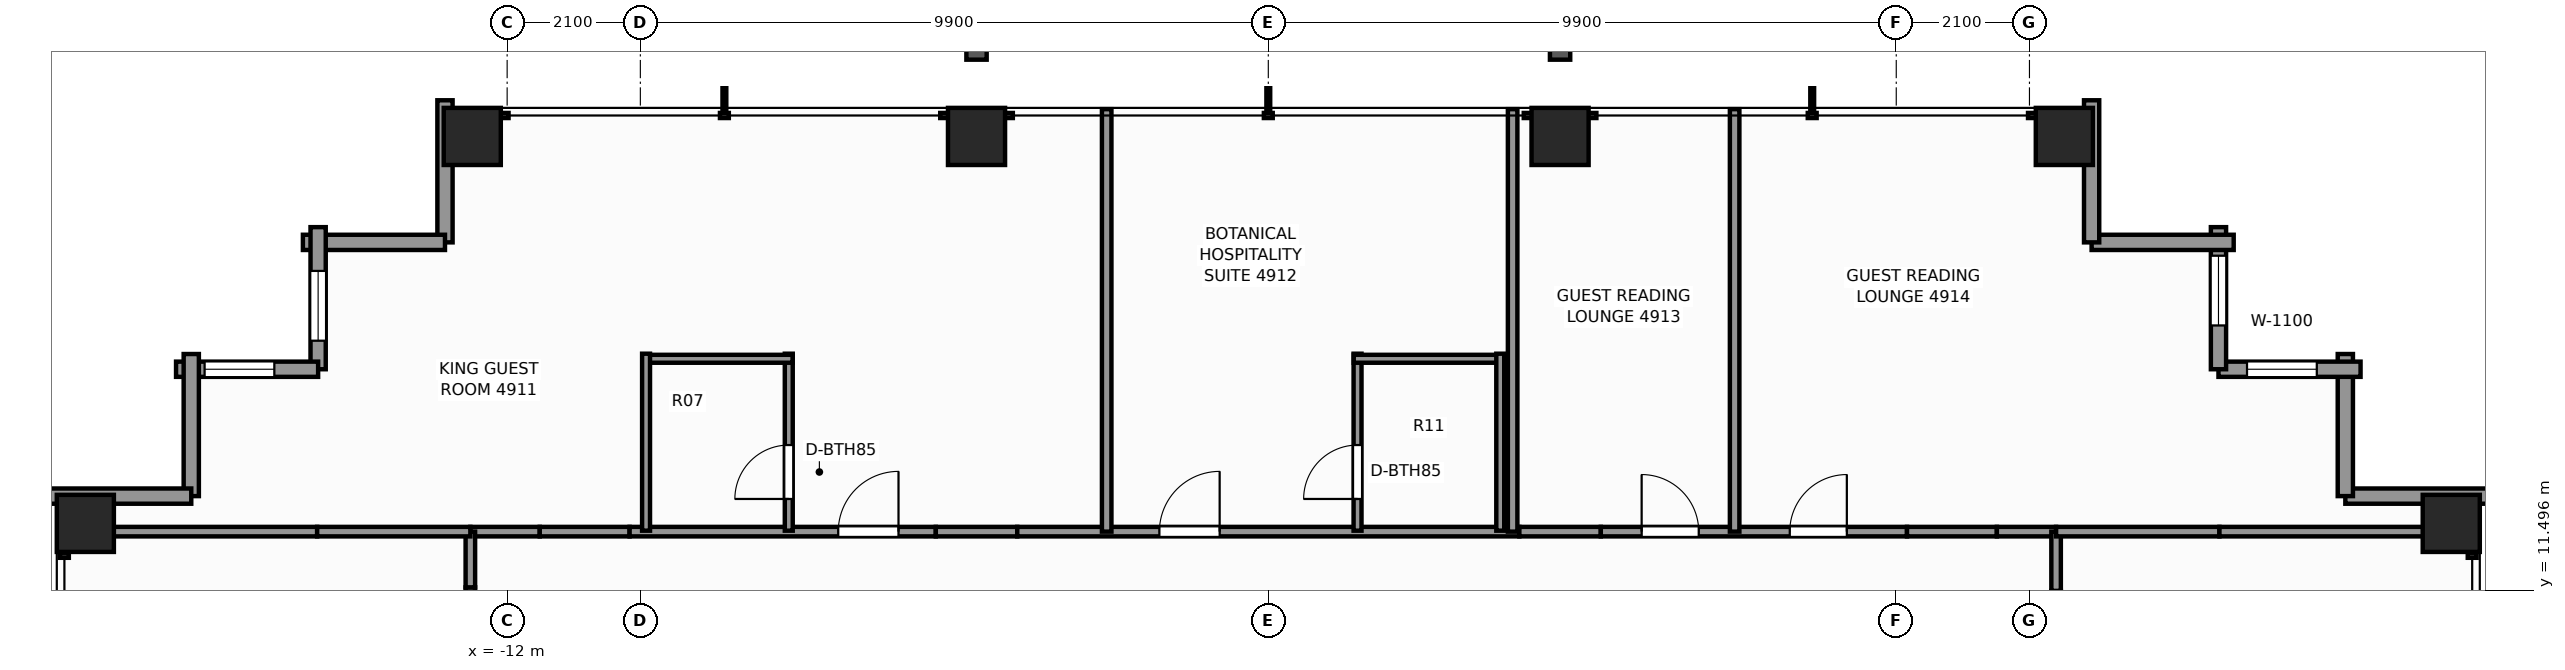
"""IFC4 building model, lengths in metres.
Left out: names, types, materials, properties, quantities, classifications, styles, units other than length and angle.
Written with IfcOpenShell. Run it as: python <this file> out.ifc"""

import sys

from ifc_helpers import new_model, si_unit, direction, frame, frame_2d, origin, origin_2d, place, context, subcontext, project, spatial, rectangle, extrude, element, fill, save


model = new_model("IFC4")
c1 = context("Model", 3, precision=1e-05, world=origin(), true_north=direction((0.0, 1.0)))
c2 = subcontext(c1, "Body", "Model", "MODEL_VIEW")
j1 = project(units=[si_unit("LENGTHUNIT", "METRE"), si_unit("PLANEANGLEUNIT", "RADIAN")], contexts=[c1])
p1 = place(None, origin())
s1 = spatial("IfcSite", under=j1, at=p1, CompositionType="ELEMENT")
p2 = place(p1, origin())
s2 = spatial("IfcBuilding", under=s1, at=p2, CompositionType="ELEMENT")
p3 = place(p2, frame((0.0, 0.0, 170.1)))
s3 = spatial("IfcBuildingStorey", under=s2, at=p3, CompositionType="ELEMENT", Elevation=170.1)
for number, where, z_axis, x_axis in (
    (1, (-12.55, 18.65, 0.0), (0.0, 0.0, 1.0), (1.0, 0.0, 0.0)),
    (2, (-4.6, 18.65, 0.0), (0.0, 0.0, 1.0), (1.0, 0.0, 0.0)),
    (3, (4.6, 18.65, 0.0), (0.0, 0.0, 1.0), (1.0, 0.0, 0.0)),
    (4, (12.55, 18.65, 0.0), (0.0, 0.0, 1.0), (1.0, 0.0, 0.0)),
    (5, (-18.65, 12.55, 0.0), (0.0, 0.0, 1.0), (1.0, 0.0, 0.0)),
    (6, (18.65, 12.55, 0.0), (0.0, 0.0, 1.0), (1.0, 0.0, 0.0)),
):
    element("IfcColumn", number, at=place(p3, frame(where, z_axis=z_axis, x_axis=x_axis)), inside=s3, PredefinedType="COLUMN", context=c2, shape_type="SweptSolid", body=[
        extrude(rectangle(XDim=0.9, YDim=0.9, at=origin_2d()), origin(), (0.0, 0.0, 1.0), 3.3),
    ])
for number, where, z_axis, x_axis in (
    (7, (16.98, 12.98, 0.0), (0.0, 0.0, 1.0), (1.0, 0.0, 0.0)),
    (8, (16.98, 15.22, 0.0), (0.0, 0.0, 1.0), (0.0, -1.0, 0.0)),
):
    element("IfcWall", number, at=place(p3, frame(where, z_axis=z_axis, x_axis=x_axis)), inside=s3, PredefinedType="STANDARD", context=c2, shape_type="SweptSolid", body=[
        extrude(rectangle(XDim=2.24, YDim=0.24, at=frame_2d((1.12, 0.0))), origin(), (0.0, 0.0, 1.0), 1.275),
    ])
p4 = place(p3, frame((14.98, 14.98, 0.0), z_axis=(0.0, 0.0, 1.0), x_axis=(1.0, 0.0, 0.0)))
e9 = element("IfcWall", 9, at=p4, inside=s3, PredefinedType="STANDARD", context=c2, shape_type="SweptSolid", body=[
    extrude(rectangle(XDim=2.24, YDim=0.24, at=frame_2d((1.12, 0.0))), origin(), (0.0, 0.0, 1.0), 2.463),
])
p5 = place(p4, frame((0.45, 0.0, 0.65)))
e10 = element("IfcOpeningElement", 10, at=p5, cuts=e9, PredefinedType="OPENING", context=c2, shape_type="SweptSolid", body=[
    extrude(rectangle(XDim=1.1, YDim=1.45, at=frame_2d((0.55, 0.725))), frame((0.0, 0.13, 0.0), z_axis=(0.0, -1.0, 0.0), x_axis=(1.0, 0.0, 0.0)), (0.0, 0.0, 1.0), 0.26),
])
p6 = place(p3, frame((14.98, 17.22, 0.0), z_axis=(0.0, 0.0, 1.0), x_axis=(0.0, -1.0, 0.0)))
e11 = element("IfcWall", 11, at=p6, inside=s3, PredefinedType="STANDARD", context=c2, shape_type="SweptSolid", body=[
    extrude(rectangle(XDim=2.24, YDim=0.24, at=frame_2d((1.12, 0.0))), origin(), (0.0, 0.0, 1.0), 2.463),
])
p7 = place(p6, frame((0.45, 0.0, 0.65)))
e12 = element("IfcOpeningElement", 12, at=p7, cuts=e11, PredefinedType="OPENING", context=c2, shape_type="SweptSolid", body=[
    extrude(rectangle(XDim=1.1, YDim=1.45, at=frame_2d((0.55, 0.725))), frame((0.0, 0.13, 0.0), z_axis=(0.0, -1.0, 0.0), x_axis=(1.0, 0.0, 0.0)), (0.0, 0.0, 1.0), 0.26),
])
for number, where, z_axis, x_axis in (
    (13, (12.98, 16.98, 0.0), (0.0, 0.0, 1.0), (1.0, 0.0, 0.0)),
    (14, (12.98, 19.22, 0.0), (0.0, 0.0, 1.0), (0.0, -1.0, 0.0)),
    (15, (-12.98, 16.98, 0.0), (0.0, 0.0, 1.0), (0.0, 1.0, 0.0)),
    (16, (-15.22, 16.98, 0.0), (0.0, 0.0, 1.0), (1.0, 0.0, 0.0)),
):
    element("IfcWall", number, at=place(p3, frame(where, z_axis=z_axis, x_axis=x_axis)), inside=s3, PredefinedType="STANDARD", context=c2, shape_type="SweptSolid", body=[
        extrude(rectangle(XDim=2.24, YDim=0.24, at=frame_2d((1.12, 0.0))), origin(), (0.0, 0.0, 1.0), 1.275),
    ])
p8 = place(p3, frame((-14.98, 14.98, 0.0), z_axis=(0.0, 0.0, 1.0), x_axis=(0.0, 1.0, 0.0)))
e17 = element("IfcWall", 17, at=p8, inside=s3, PredefinedType="STANDARD", context=c2, shape_type="SweptSolid", body=[
    extrude(rectangle(XDim=2.24, YDim=0.24, at=frame_2d((1.12, 0.0))), origin(), (0.0, 0.0, 1.0), 2.463),
])
p9 = place(p8, frame((0.45, 0.0, 0.65)))
e18 = element("IfcOpeningElement", 18, at=p9, cuts=e17, PredefinedType="OPENING", context=c2, shape_type="SweptSolid", body=[
    extrude(rectangle(XDim=1.1, YDim=1.45, at=frame_2d((0.55, 0.725))), frame((0.0, 0.13, 0.0), z_axis=(0.0, -1.0, 0.0), x_axis=(1.0, 0.0, 0.0)), (0.0, 0.0, 1.0), 0.26),
])
p10 = place(p3, frame((-17.22, 14.98, 0.0), z_axis=(0.0, 0.0, 1.0), x_axis=(1.0, 0.0, 0.0)))
e19 = element("IfcWall", 19, at=p10, inside=s3, PredefinedType="STANDARD", context=c2, shape_type="SweptSolid", body=[
    extrude(rectangle(XDim=2.24, YDim=0.24, at=frame_2d((1.12, 0.0))), origin(), (0.0, 0.0, 1.0), 2.463),
])
p11 = place(p10, frame((0.45, 0.0, 0.65)))
e20 = element("IfcOpeningElement", 20, at=p11, cuts=e19, PredefinedType="OPENING", context=c2, shape_type="SweptSolid", body=[
    extrude(rectangle(XDim=1.1, YDim=1.45, at=frame_2d((0.55, 0.725))), frame((0.0, 0.13, 0.0), z_axis=(0.0, -1.0, 0.0), x_axis=(1.0, 0.0, 0.0)), (0.0, 0.0, 1.0), 0.26),
])
for number, where, z_axis, x_axis in (
    (21, (-16.98, 12.98, 0.0), (0.0, 0.0, 1.0), (0.0, 1.0, 0.0)),
    (22, (-19.22, 12.98, 0.0), (0.0, 0.0, 1.0), (1.0, 0.0, 0.0)),
):
    element("IfcWall", number, at=place(p3, frame(where, z_axis=z_axis, x_axis=x_axis)), inside=s3, PredefinedType="STANDARD", context=c2, shape_type="SweptSolid", body=[
        extrude(rectangle(XDim=2.24, YDim=0.24, at=frame_2d((1.12, 0.0))), origin(), (0.0, 0.0, 1.0), 1.275),
    ])
p12 = place(p3, frame((-12.58, 12.42, 0.0), z_axis=(0.0, 0.0, 1.0), x_axis=(1.0, 0.0, 0.0)))
e23 = element("IfcWall", 23, at=p12, inside=s3, PredefinedType="PARTITIONING", context=c2, shape_type="SweptSolid", body=[
    extrude(rectangle(XDim=1.094, YDim=0.15, at=frame_2d((0.547, 0.0))), origin(), (0.0, 0.0, 1.0), 3.08),
])
p13 = place(p3, frame((-11.486, 12.42, 0.0), z_axis=(0.0, 0.0, 1.0), x_axis=(1.0, 0.0, 0.0)))
e24 = element("IfcWall", 24, at=p13, inside=s3, PredefinedType="PARTITIONING", context=c2, shape_type="SweptSolid", body=[
    extrude(rectangle(XDim=1.417, YDim=0.15, at=frame_2d((0.708, 0.0))), origin(), (0.0, 0.0, 1.0), 1.265),
])
p14 = place(p3, frame((-10.069, 12.42, 0.0), z_axis=(0.0, 0.0, 1.0), x_axis=(1.0, 0.0, 0.0)))
e25 = element("IfcWall", 25, at=p14, inside=s3, PredefinedType="PARTITIONING", context=c2, shape_type="SweptSolid", body=[
    extrude(rectangle(XDim=4.827, YDim=0.15, at=frame_2d((2.414, 0.0))), origin(), (0.0, 0.0, 1.0), 3.08),
])
p15 = place(p14, frame((3.289, 0.0, 0.0)))
e26 = element("IfcOpeningElement", 26, at=p15, cuts=e25, PredefinedType="OPENING", context=c2, shape_type="SweptSolid", body=[
    extrude(rectangle(XDim=0.95, YDim=2.06, at=frame_2d((0.475, 1.03))), frame((0.0, 0.085, 0.0), z_axis=(0.0, -1.0, 0.0), x_axis=(1.0, 0.0, 0.0)), (0.0, 0.0, 1.0), 0.17),
])
p16 = place(p3, frame((-5.242, 12.42, 0.0), z_axis=(0.0, 0.0, 1.0), x_axis=(1.0, 0.0, 0.0)))
e27 = element("IfcWall", 27, at=p16, inside=s3, PredefinedType="PARTITIONING", context=c2, shape_type="SweptSolid", body=[
    extrude(rectangle(XDim=1.284, YDim=0.15, at=frame_2d((0.642, 0.0))), origin(), (0.0, 0.0, 1.0), 1.265),
])
p17 = place(p3, frame((-3.958, 12.42, 0.0), z_axis=(0.0, 0.0, 1.0), x_axis=(1.0, 0.0, 0.0)))
e28 = element("IfcWall", 28, at=p17, inside=s3, PredefinedType="PARTITIONING", context=c2, shape_type="SweptSolid", body=[
    extrude(rectangle(XDim=7.916, YDim=0.15, at=frame_2d((3.958, 0.0))), origin(), (0.0, 0.0, 1.0), 2.369),
])
p18 = place(p17, frame((2.241, 0.0, 0.0)))
e29 = element("IfcOpeningElement", 29, at=p18, cuts=e28, PredefinedType="OPENING", context=c2, shape_type="SweptSolid", body=[
    extrude(rectangle(XDim=0.95, YDim=2.06, at=frame_2d((0.475, 1.03))), frame((0.0, 0.085, 0.0), z_axis=(0.0, -1.0, 0.0), x_axis=(1.0, 0.0, 0.0)), (0.0, 0.0, 1.0), 0.17),
])
p19 = place(p3, frame((3.958, 12.42, 0.0), z_axis=(0.0, 0.0, 1.0), x_axis=(1.0, 0.0, 0.0)))
e30 = element("IfcWall", 30, at=p19, inside=s3, PredefinedType="PARTITIONING", context=c2, shape_type="SweptSolid", body=[
    extrude(rectangle(XDim=1.284, YDim=0.15, at=frame_2d((0.642, 0.0))), origin(), (0.0, 0.0, 1.0), 1.265),
])
p20 = place(p3, frame((5.242, 12.42, 0.0), z_axis=(0.0, 0.0, 1.0), x_axis=(1.0, 0.0, 0.0)))
e31 = element("IfcWall", 31, at=p20, inside=s3, PredefinedType="PARTITIONING", context=c2, shape_type="SweptSolid", body=[
    extrude(rectangle(XDim=4.827, YDim=0.15, at=frame_2d((2.414, 0.0))), origin(), (0.0, 0.0, 1.0), 3.08),
])
p21 = place(p20, frame((0.644, 0.0, 0.0)))
e32 = element("IfcOpeningElement", 32, at=p21, cuts=e31, PredefinedType="OPENING", context=c2, shape_type="SweptSolid", body=[
    extrude(rectangle(XDim=0.9, YDim=2.06, at=frame_2d((0.45, 1.03))), frame((0.0, 0.085, 0.0), z_axis=(0.0, -1.0, 0.0), x_axis=(1.0, 0.0, 0.0)), (0.0, 0.0, 1.0), 0.17),
])
p22 = place(p20, frame((2.979, 0.0, 0.0)))
e33 = element("IfcOpeningElement", 33, at=p22, cuts=e31, PredefinedType="OPENING", context=c2, shape_type="SweptSolid", body=[
    extrude(rectangle(XDim=0.9, YDim=2.06, at=frame_2d((0.45, 1.03))), frame((0.0, 0.085, 0.0), z_axis=(0.0, -1.0, 0.0), x_axis=(1.0, 0.0, 0.0)), (0.0, 0.0, 1.0), 0.17),
])
p23 = place(p3, frame((10.069, 12.42, 0.0), z_axis=(0.0, 0.0, 1.0), x_axis=(1.0, 0.0, 0.0)))
e34 = element("IfcWall", 34, at=p23, inside=s3, PredefinedType="PARTITIONING", context=c2, shape_type="SweptSolid", body=[
    extrude(rectangle(XDim=1.417, YDim=0.15, at=frame_2d((0.708, 0.0))), origin(), (0.0, 0.0, 1.0), 1.265),
])
p24 = place(p3, frame((11.486, 12.42, 0.0), z_axis=(0.0, 0.0, 1.0), x_axis=(1.0, 0.0, 0.0)))
e35 = element("IfcWall", 35, at=p24, inside=s3, PredefinedType="PARTITIONING", context=c2, shape_type="SweptSolid", body=[
    extrude(rectangle(XDim=0.934, YDim=0.15, at=frame_2d((0.467, 0.0))), origin(), (0.0, 0.0, 1.0), 3.08),
])
p25 = place(p3, frame((-12.58, 10.125, 0.0), z_axis=(0.0, 0.0, 1.0), x_axis=(0.0, 1.0, 0.0)))
e36 = element("IfcWall", 36, at=p25, inside=s3, PredefinedType="PARTITIONING", context=c2, shape_type="SweptSolid", body=[
    extrude(rectangle(XDim=1.417, YDim=0.15, at=frame_2d((0.708, 0.0))), origin(), (0.0, 0.0, 1.0), 1.265),
])
p26 = place(p3, frame((-12.58, 11.542, 0.0), z_axis=(0.0, 0.0, 1.0), x_axis=(0.0, 1.0, 0.0)))
e37 = element("IfcWall", 37, at=p26, inside=s3, PredefinedType="PARTITIONING", context=c2, shape_type="SweptSolid", body=[
    extrude(rectangle(XDim=0.878, YDim=0.15, at=frame_2d((0.439, 0.0))), origin(), (0.0, 0.0, 1.0), 3.08),
])
p27 = place(p3, frame((12.42, 11.486, 0.0), z_axis=(0.0, 0.0, 1.0), x_axis=(0.0, 1.0, 0.0)))
e38 = element("IfcWall", 38, at=p27, inside=s3, PredefinedType="PARTITIONING", context=c2, shape_type="SweptSolid", body=[
    extrude(rectangle(XDim=0.934, YDim=0.15, at=frame_2d((0.467, 0.0))), origin(), (0.0, 0.0, 1.0), 3.08),
])
p28 = place(p3, frame((-19.08, 12.42, 0.0), z_axis=(0.0, 0.0, 1.0), x_axis=(1.0, 0.0, 0.0)))
e39 = element("IfcWall", 39, at=p28, inside=s3, PredefinedType="PARTITIONING", context=c2, shape_type="SweptSolid", body=[
    extrude(rectangle(XDim=4.085, YDim=0.15, at=frame_2d((2.042, 0.0))), origin(), (0.0, 0.0, 1.0), 1.265),
])
p29 = place(p3, frame((-14.995, 12.42, 0.0), z_axis=(0.0, 0.0, 1.0), x_axis=(1.0, 0.0, 0.0)))
e40 = element("IfcWall", 40, at=p29, inside=s3, PredefinedType="PARTITIONING", context=c2, shape_type="SweptSolid", body=[
    extrude(rectangle(XDim=2.415, YDim=0.15, at=frame_2d((1.208, 0.0))), origin(), (0.0, 0.0, 1.0), 3.08),
])
p30 = place(p3, frame((12.42, 12.42, 0.0), z_axis=(0.0, 0.0, 1.0), x_axis=(1.0, 0.0, 0.0)))
e41 = element("IfcWall", 41, at=p30, inside=s3, PredefinedType="PARTITIONING", context=c2, shape_type="SweptSolid", body=[
    extrude(rectangle(XDim=2.575, YDim=0.15, at=frame_2d((1.288, 0.0))), origin(), (0.0, 0.0, 1.0), 3.08),
])
p31 = place(p3, frame((14.995, 12.42, 0.0), z_axis=(0.0, 0.0, 1.0), x_axis=(1.0, 0.0, 0.0)))
e42 = element("IfcWall", 42, at=p31, inside=s3, PredefinedType="PARTITIONING", context=c2, shape_type="SweptSolid", body=[
    extrude(rectangle(XDim=4.085, YDim=0.15, at=frame_2d((2.042, 0.0))), origin(), (0.0, 0.0, 1.0), 1.265),
])
p32 = place(p3, frame((-2.548, 12.42, 0.0), z_axis=(0.0, 0.0, 1.0), x_axis=(0.0, 1.0, 0.0)))
e43 = element("IfcWall", 43, at=p32, inside=s3, PredefinedType="PARTITIONING", context=c2, shape_type="SweptSolid", body=[
    extrude(rectangle(XDim=6.66, YDim=0.15, at=frame_2d((3.33, 0.0))), origin(), (0.0, 0.0, 1.0), 3.08),
])
p33 = place(p3, frame((-7.56, 12.435, 0.0), z_axis=(0.0, 0.0, 1.0), x_axis=(0.0, 1.0, 0.0)))
e44 = element("IfcWall", 44, at=p33, inside=s3, PredefinedType="PARTITIONING", context=c2, shape_type="SweptSolid", body=[
    extrude(rectangle(XDim=2.79, YDim=0.125, at=frame_2d((1.395, 0.0))), origin(), (0.0, 0.0, 1.0), 3.08),
])
p34 = place(p33, frame((0.5, 0.0, 0.0)))
e45 = element("IfcOpeningElement", 45, at=p34, cuts=e44, PredefinedType="OPENING", context=c2, shape_type="SweptSolid", body=[
    extrude(rectangle(XDim=0.85, YDim=2.03, at=frame_2d((0.425, 1.015))), frame((0.0, 0.073, 0.0), z_axis=(0.0, -1.0, 0.0), x_axis=(1.0, 0.0, 0.0)), (0.0, 0.0, 1.0), 0.145),
])
p35 = place(p3, frame((-9.87, 15.145, 0.0), z_axis=(0.0, 0.0, 1.0), x_axis=(1.0, 0.0, 0.0)))
e46 = element("IfcWall", 46, at=p35, inside=s3, PredefinedType="PARTITIONING", context=c2, shape_type="SweptSolid", body=[
    extrude(rectangle(XDim=2.37, YDim=0.125, at=frame_2d((1.185, 0.0))), origin(), (0.0, 0.0, 1.0), 3.08),
])
p36 = place(p3, frame((-9.81, 12.435, 0.0), z_axis=(0.0, 0.0, 1.0), x_axis=(0.0, 1.0, 0.0)))
e47 = element("IfcWall", 47, at=p36, inside=s3, PredefinedType="PARTITIONING", context=c2, shape_type="SweptSolid", body=[
    extrude(rectangle(XDim=2.79, YDim=0.125, at=frame_2d((1.395, 0.0))), origin(), (0.0, 0.0, 1.0), 3.08),
])
p37 = place(p3, frame((3.852, 12.42, 0.0), z_axis=(0.0, 0.0, 1.0), x_axis=(0.0, 1.0, 0.0)))
e48 = element("IfcWall", 48, at=p37, inside=s3, PredefinedType="PARTITIONING", context=c2, shape_type="SweptSolid", body=[
    extrude(rectangle(XDim=6.66, YDim=0.15, at=frame_2d((3.33, 0.0))), origin(), (0.0, 0.0, 1.0), 3.08),
])
p38 = place(p3, frame((1.407, 12.435, 0.0), z_axis=(0.0, 0.0, 1.0), x_axis=(0.0, 1.0, 0.0)))
e49 = element("IfcWall", 49, at=p38, inside=s3, PredefinedType="PARTITIONING", context=c2, shape_type="SweptSolid", body=[
    extrude(rectangle(XDim=2.79, YDim=0.125, at=frame_2d((1.395, 0.0))), origin(), (0.0, 0.0, 1.0), 3.08),
])
p39 = place(p38, frame((0.5, 0.0, 0.0)))
e50 = element("IfcOpeningElement", 50, at=p39, cuts=e49, PredefinedType="OPENING", context=c2, shape_type="SweptSolid", body=[
    extrude(rectangle(XDim=0.85, YDim=2.03, at=frame_2d((0.425, 1.015))), frame((0.0, 0.073, 0.0), z_axis=(0.0, -1.0, 0.0), x_axis=(1.0, 0.0, 0.0)), (0.0, 0.0, 1.0), 0.145),
])
p40 = place(p3, frame((1.347, 15.145, 0.0), z_axis=(0.0, 0.0, 1.0), x_axis=(1.0, 0.0, 0.0)))
e51 = element("IfcWall", 51, at=p40, inside=s3, PredefinedType="PARTITIONING", context=c2, shape_type="SweptSolid", body=[
    extrude(rectangle(XDim=2.37, YDim=0.125, at=frame_2d((1.185, 0.0))), origin(), (0.0, 0.0, 1.0), 2.369),
])
p41 = place(p3, frame((3.657, 12.435, 0.0), z_axis=(0.0, 0.0, 1.0), x_axis=(0.0, 1.0, 0.0)))
e52 = element("IfcWall", 52, at=p41, inside=s3, PredefinedType="PARTITIONING", context=c2, shape_type="SweptSolid", body=[
    extrude(rectangle(XDim=2.79, YDim=0.125, at=frame_2d((1.395, 0.0))), origin(), (0.0, 0.0, 1.0), 3.08),
])
p42 = place(p3, frame((7.352, 12.42, 0.0), z_axis=(0.0, 0.0, 1.0), x_axis=(0.0, 1.0, 0.0)))
e53 = element("IfcWall", 53, at=p42, inside=s3, PredefinedType="PARTITIONING", context=c2, shape_type="SweptSolid", body=[
    extrude(rectangle(XDim=6.66, YDim=0.15, at=frame_2d((3.33, 0.0))), origin(), (0.0, 0.0, 1.0), 2.453),
])
p43 = place(p5, origin())
e54 = element("IfcWindow", 54, at=p43, inside=s3, PartitioningType="SINGLE_PANEL", PredefinedType="WINDOW", context=c2, shape_type="SweptSolid", body=[
    extrude(rectangle(XDim=1.1, YDim=1.45, at=frame_2d((0.55, 0.725))), frame((0.0, 0.03, 0.0), z_axis=(0.0, -1.0, 0.0), x_axis=(1.0, 0.0, 0.0)), (0.0, 0.0, 1.0), 0.06),
])
fill(e10, e54)
p44 = place(p7, origin())
e55 = element("IfcWindow", 55, at=p44, inside=s3, PartitioningType="SINGLE_PANEL", PredefinedType="WINDOW", context=c2, shape_type="SweptSolid", body=[
    extrude(rectangle(XDim=1.1, YDim=1.45, at=frame_2d((0.55, 0.725))), frame((0.0, 0.03, 0.0), z_axis=(0.0, -1.0, 0.0), x_axis=(1.0, 0.0, 0.0)), (0.0, 0.0, 1.0), 0.06),
])
fill(e12, e55)
p45 = place(p9, origin())
e56 = element("IfcWindow", 56, at=p45, inside=s3, PartitioningType="SINGLE_PANEL", PredefinedType="WINDOW", context=c2, shape_type="SweptSolid", body=[
    extrude(rectangle(XDim=1.1, YDim=1.45, at=frame_2d((0.55, 0.725))), frame((0.0, 0.03, 0.0), z_axis=(0.0, -1.0, 0.0), x_axis=(1.0, 0.0, 0.0)), (0.0, 0.0, 1.0), 0.06),
])
fill(e18, e56)
p46 = place(p11, origin())
e57 = element("IfcWindow", 57, at=p46, inside=s3, PartitioningType="SINGLE_PANEL", PredefinedType="WINDOW", context=c2, shape_type="SweptSolid", body=[
    extrude(rectangle(XDim=1.1, YDim=1.45, at=frame_2d((0.55, 0.725))), frame((0.0, 0.03, 0.0), z_axis=(0.0, -1.0, 0.0), x_axis=(1.0, 0.0, 0.0)), (0.0, 0.0, 1.0), 0.06),
])
fill(e20, e57)
p47 = place(p34, origin())
e58 = element("IfcDoor", 58, at=p47, inside=s3, OperationType="SINGLE_SWING_LEFT", PredefinedType="DOOR", context=c2, shape_type="SweptSolid", body=[
    extrude(rectangle(XDim=0.85, YDim=2.03, at=frame_2d((0.425, 1.015))), frame((0.0, 0.025, 0.0), z_axis=(0.0, -1.0, 0.0), x_axis=(1.0, 0.0, 0.0)), (0.0, 0.0, 1.0), 0.05),
])
fill(e45, e58)
p48 = place(p15, origin())
e59 = element("IfcDoor", 59, at=p48, inside=s3, OperationType="SINGLE_SWING_RIGHT", PredefinedType="DOOR", context=c2, shape_type="SweptSolid", body=[
    extrude(rectangle(XDim=0.95, YDim=2.06, at=frame_2d((0.475, 1.03))), frame((0.0, 0.025, 0.0), z_axis=(0.0, -1.0, 0.0), x_axis=(1.0, 0.0, 0.0)), (0.0, 0.0, 1.0), 0.05),
])
fill(e26, e59)
p49 = place(p39, origin())
e60 = element("IfcDoor", 60, at=p49, inside=s3, OperationType="SINGLE_SWING_LEFT", PredefinedType="DOOR", context=c2, shape_type="SweptSolid", body=[
    extrude(rectangle(XDim=0.85, YDim=2.03, at=frame_2d((0.425, 1.015))), frame((0.0, 0.025, 0.0), z_axis=(0.0, -1.0, 0.0), x_axis=(1.0, 0.0, 0.0)), (0.0, 0.0, 1.0), 0.05),
])
fill(e50, e60)
p50 = place(p18, origin())
e61 = element("IfcDoor", 61, at=p50, inside=s3, OperationType="SINGLE_SWING_RIGHT", PredefinedType="DOOR", context=c2, shape_type="SweptSolid", body=[
    extrude(rectangle(XDim=0.95, YDim=2.06, at=frame_2d((0.475, 1.03))), frame((0.0, 0.025, 0.0), z_axis=(0.0, -1.0, 0.0), x_axis=(1.0, 0.0, 0.0)), (0.0, 0.0, 1.0), 0.05),
])
fill(e29, e61)
p51 = place(p21, origin())
e62 = element("IfcDoor", 62, at=p51, inside=s3, OperationType="SINGLE_SWING_LEFT", PredefinedType="DOOR", context=c2, shape_type="SweptSolid", body=[
    extrude(rectangle(XDim=0.9, YDim=2.06, at=frame_2d((0.45, 1.03))), frame((0.0, 0.025, 0.0), z_axis=(0.0, -1.0, 0.0), x_axis=(1.0, 0.0, 0.0)), (0.0, 0.0, 1.0), 0.05),
])
fill(e32, e62)
p52 = place(p22, origin())
e63 = element("IfcDoor", 63, at=p52, inside=s3, OperationType="SINGLE_SWING_RIGHT", PredefinedType="DOOR", context=c2, shape_type="SweptSolid", body=[
    extrude(rectangle(XDim=0.9, YDim=2.06, at=frame_2d((0.45, 1.03))), frame((0.0, 0.025, 0.0), z_axis=(0.0, -1.0, 0.0), x_axis=(1.0, 0.0, 0.0)), (0.0, 0.0, 1.0), 0.05),
])
fill(e33, e63)
save(model, sys.argv[1])
